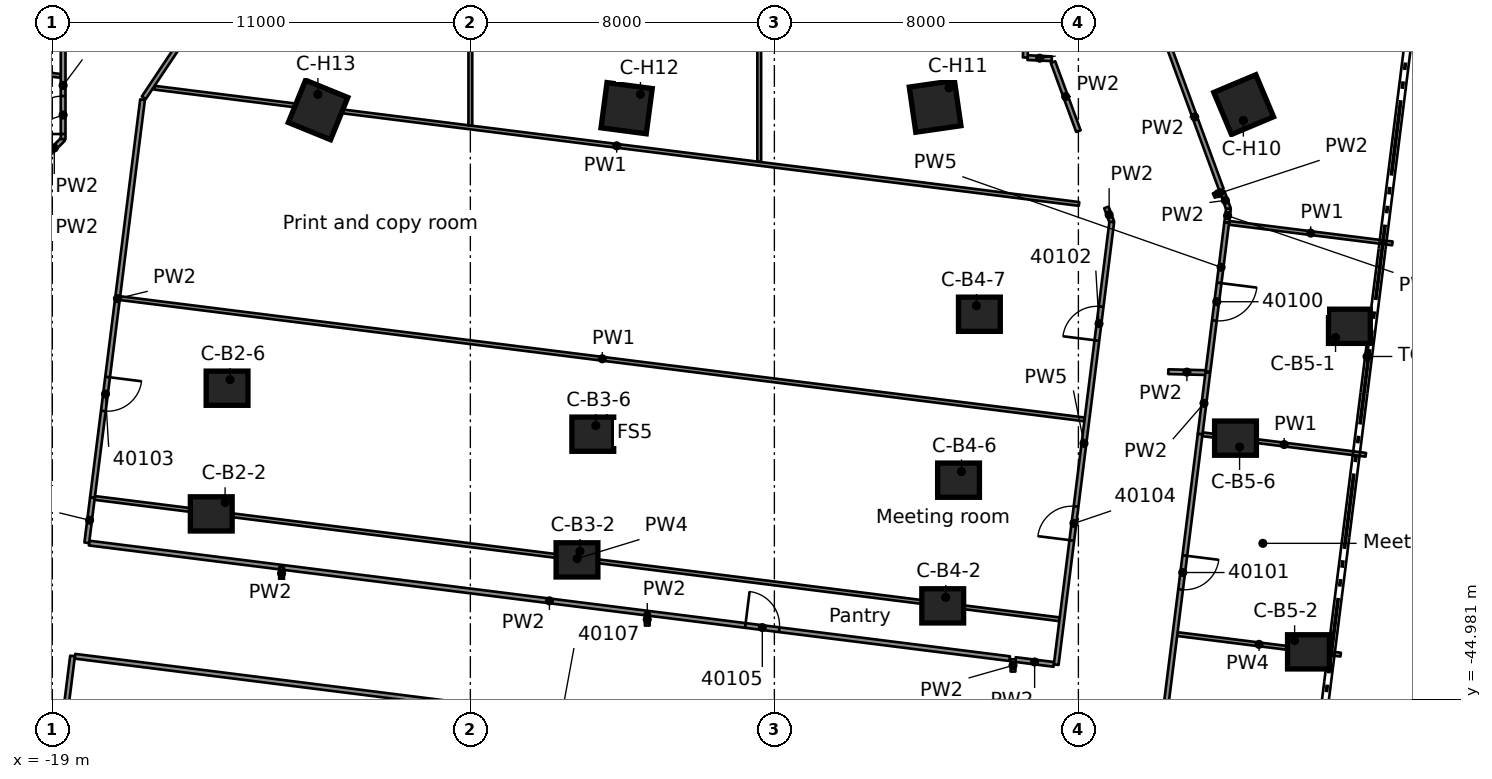
"""IFC4 building model, lengths in metres.
Left out: names, types, materials, properties, quantities, classifications, styles, units other than length and angle.
Written with IfcOpenShell. Run it as: python <this file> out.ifc"""

import sys

from ifc_helpers import new_model, si_unit, direction, frame, frame_2d, origin, origin_2d, place, context, subcontext, project, spatial, rectangle, extrude, element, fill, save


model = new_model("IFC4")
c1 = context("Model", 3, precision=1e-05, world=origin(), true_north=direction((0.0, 1.0)))
c2 = subcontext(c1, "Body", "Model", "MODEL_VIEW")
j1 = project(units=[si_unit("LENGTHUNIT", "METRE"), si_unit("PLANEANGLEUNIT", "RADIAN")], contexts=[c1])
p1 = place(None, origin())
s1 = spatial("IfcSite", under=j1, at=p1, CompositionType="ELEMENT")
p2 = place(p1, origin())
s2 = spatial("IfcBuilding", under=s1, at=p2, CompositionType="ELEMENT")
p3 = place(p2, frame((0.0, 0.0, 199.1)))
s3 = spatial("IfcBuildingStorey", under=s2, at=p3, CompositionType="ELEMENT", Elevation=199.1)
for number, where, z_axis, x_axis in (
    (1, (-14.818, -40.098, 0.0), (0.0, 0.0, 1.0), (1.0, 0.0, 0.0)),
    (2, (-14.402, -36.791, 0.0), (0.0, 0.0, 1.0), (1.0, 0.0, 0.0)),
    (3, (-5.194, -41.308, 0.0), (0.0, 0.0, 1.0), (1.0, 0.0, 0.0)),
    (4, (-4.778, -38.001, 0.0), (0.0, 0.0, 1.0), (1.0, 0.0, 0.0)),
    (5, (4.43, -42.518, 0.0), (0.0, 0.0, 1.0), (1.0, 0.0, 0.0)),
    (6, (4.846, -39.211, 0.0), (0.0, 0.0, 1.0), (1.0, 0.0, 0.0)),
    (7, (5.395, -34.845, 0.0), (0.0, 0.0, 1.0), (1.0, 0.0, 0.0)),
    (8, (15.131, -35.162, 0.0), (0.0, 0.0, 1.0), (1.0, 0.0, 0.0)),
    (9, (14.054, -43.728, 0.0), (0.0, 0.0, 1.0), (1.0, 0.0, 0.0)),
    (10, (12.134, -38.105, 0.0), (0.0, 0.0, 1.0), (1.0, 0.0, 0.0)),
):
    element("IfcColumn", number, at=place(p3, frame(where, z_axis=z_axis, x_axis=x_axis)), inside=s3, PredefinedType="COLUMN", context=c2, shape_type="SweptSolid", body=[
        extrude(rectangle(XDim=1.1, YDim=0.9, at=origin_2d()), origin(), (0.0, 0.0, 1.0), 3.5),
    ])
for number, where, z_axis, x_axis in (
    (11, (12.349, -29.329, 0.0), (0.0, 0.0, 1.0), (0.388, -0.922, 0.0)),
    (12, (4.23, -29.376, 0.0), (0.0, 0.0, 1.0), (0.143, -0.99, 0.0)),
    (13, (-3.888, -29.423, 0.0), (0.0, 0.0, 1.0), (-0.131, -0.991, 0.0)),
    (14, (-12.007, -29.47, 0.0), (0.0, 0.0, 1.0), (-0.377, -0.926, 0.0)),
):
    element("IfcColumn", number, at=place(p3, frame(where, z_axis=z_axis, x_axis=x_axis)), inside=s3, PredefinedType="COLUMN", context=c2, shape_type="SweptSolid", body=[
        extrude(rectangle(XDim=1.2, YDim=1.2, at=origin_2d()), origin(), (0.0, 0.0, 1.0), 3.5),
    ])
p4 = place(p3, frame((-0.399, -15.062, 0.0), z_axis=(0.0, 0.0, 1.0), x_axis=(6.1913754e-05, -0.999999998083, 0.0)))
e15 = element("IfcWall", 15, at=p4, inside=s3, PredefinedType="PARTITIONING", context=c2, shape_type="SweptSolid", body=[
    extrude(rectangle(XDim=15.773, YDim=0.1, at=frame_2d((7.886, 0.0))), origin(), (0.0, 0.0, 1.0), 3.03),
])
p5 = place(p3, frame((7.332, -28.21, 0.0), z_axis=(0.0, 0.0, 1.0), x_axis=(0.34522583337, -0.938519644959, 0.0)))
e16 = element("IfcWall", 16, at=p5, inside=s3, PredefinedType="PARTITIONING", context=c2, shape_type="SweptSolid", body=[
    extrude(rectangle(XDim=1.935, YDim=0.125, at=frame_2d((0.967, 0.0))), origin(), (0.0, 0.0, 1.0), 3.03),
])
p6 = place(p3, frame((8.738, -32.034, 0.0), z_axis=(0.0, 0.0, 1.0), x_axis=(0.344934891115, -0.938626614204, 0.0)))
e17 = element("IfcWall", 17, at=p6, inside=s3, PredefinedType="PARTITIONING", context=c2, shape_type="SweptSolid", body=[
    extrude(rectangle(XDim=0.411, YDim=0.125, at=frame_2d((0.206, 0.0))), origin(), (0.0, 0.0, 1.0), 3.03),
])
p7 = place(p3, frame((10.358, -27.743, 0.0), z_axis=(0.0, 0.0, 1.0), x_axis=(0.34503845991, -0.938588547332, 0.0)))
e18 = element("IfcWall", 18, at=p7, inside=s3, PredefinedType="PARTITIONING", context=c2, shape_type="SweptSolid", body=[
    extrude(rectangle(XDim=4.072, YDim=0.125, at=frame_2d((2.036, 0.0))), origin(), (0.0, 0.0, 1.0), 3.03),
])
p8 = place(p3, frame((11.786, -31.628, 0.0), z_axis=(0.0, 0.0, 1.0), x_axis=(0.346065449672, -0.938210373287, 0.0)))
e19 = element("IfcWall", 19, at=p8, inside=s3, PredefinedType="PARTITIONING", context=c2, shape_type="SweptSolid", body=[
    extrude(rectangle(XDim=0.471, YDim=0.125, at=frame_2d((0.236, 0.0))), origin(), (0.0, 0.0, 1.0), 3.03),
])
p9 = place(p3, frame((6.979, -47.035, 0.0), z_axis=(0.0, 0.0, 1.0), x_axis=(-0.992192052325, 0.124719410292, 0.0)))
e20 = element("IfcWall", 20, at=p9, inside=s3, PredefinedType="PARTITIONING", context=c2, shape_type="SweptSolid", body=[
    extrude(rectangle(XDim=25.585, YDim=0.125, at=frame_2d((12.792, 0.0))), origin(), (0.0, 0.0, 1.0), 3.03),
])
p10 = place(p9, frame((11.788, 0.0, 0.0)))
e21 = element("IfcOpeningElement", 21, at=p10, cuts=e20, PredefinedType="OPENING", context=c2, shape_type="SweptSolid", body=[
    extrude(rectangle(XDim=1.8, YDim=2.1, at=frame_2d((0.9, 1.05))), frame((0.0, 0.073, 0.0), z_axis=(0.0, -1.0, 0.0), x_axis=(1.0, 0.0, 0.0)), (0.0, 0.0, 1.0), 0.145),
])
p11 = place(p3, frame((-18.032, -40.866, 0.0), z_axis=(0.0, 0.0, 1.0), x_axis=(0.9922120451, -0.124560256738, 0.0)))
e22 = element("IfcWall", 22, at=p11, inside=s3, PredefinedType="PARTITIONING", context=c2, shape_type="SweptSolid", body=[
    extrude(rectangle(XDim=24.414, YDim=0.125, at=frame_2d((12.207, 0.0))), origin(), (0.0, 0.0, 1.0), 3.03),
])
p12 = place(p11, frame((17.404, 0.0, 0.0)))
e23 = element("IfcOpeningElement", 23, at=p12, cuts=e22, PredefinedType="OPENING", context=c2, shape_type="SweptSolid", body=[
    extrude(rectangle(XDim=0.9, YDim=2.1, at=frame_2d((0.45, 1.05))), frame((0.0, 0.073, 0.0), z_axis=(0.0, -1.0, 0.0), x_axis=(1.0, 0.0, 0.0)), (0.0, 0.0, 1.0), 0.145),
])
p13 = place(p3, frame((6.342, -43.931, 0.0), z_axis=(0.0, 0.0, 1.0), x_axis=(0.992192944833, -0.124712309833, 0.0)))
e24 = element("IfcWall", 24, at=p13, inside=s3, PredefinedType="PARTITIONING", context=c2, shape_type="SweptSolid", body=[
    extrude(rectangle(XDim=1.02, YDim=0.125, at=frame_2d((0.51, 0.0))), origin(), (0.0, 0.0, 1.0), 3.03),
])
p14 = place(p3, frame((-17.883, -39.679, 0.0), z_axis=(0.0, 0.0, 1.0), x_axis=(0.992186741223, -0.124761654932, 0.0)))
e25 = element("IfcWall", 25, at=p14, inside=s3, PredefinedType="PARTITIONING", context=c2, shape_type="SweptSolid", body=[
    extrude(rectangle(XDim=25.586, YDim=0.1, at=frame_2d((12.793, 0.0))), origin(), (0.0, 0.0, 1.0), 2.395),
])
p15 = place(p3, frame((10.605, -43.261, 0.0), z_axis=(0.0, 0.0, 1.0), x_axis=(0.992195268651, -0.124693820479, 0.0)))
e26 = element("IfcWall", 26, at=p15, inside=s3, PredefinedType="PARTITIONING", context=c2, shape_type="SweptSolid", body=[
    extrude(rectangle(XDim=4.331, YDim=0.1, at=frame_2d((2.166, 0.0))), origin(), (0.0, 0.0, 1.0), 2.395),
])
p16 = place(p3, frame((-17.221, -34.421, 0.0), z_axis=(0.0, 0.0, 1.0), x_axis=(0.992190871449, -0.124728804262, 0.0)))
e27 = element("IfcWall", 27, at=p16, inside=s3, PredefinedType="PARTITIONING", context=c2, shape_type="SweptSolid", body=[
    extrude(rectangle(XDim=25.585, YDim=0.1, at=frame_2d((12.792, 0.0))), origin(), (0.0, 0.0, 1.0), 3.03),
])
p17 = place(p3, frame((11.266, -38.003, 0.0), z_axis=(0.0, 0.0, 1.0), x_axis=(0.992194392082, -0.124700795187, 0.0)))
e28 = element("IfcWall", 28, at=p17, inside=s3, PredefinedType="PARTITIONING", context=c2, shape_type="SweptSolid", body=[
    extrude(rectangle(XDim=4.331, YDim=0.1, at=frame_2d((2.165, 0.0))), origin(), (0.0, 0.0, 1.0), 3.03),
])
p18 = place(p3, frame((-23.921, -27.927, 0.0), z_axis=(0.0, 0.0, 1.0), x_axis=(0.992179593467, -0.124818485443, 0.0)))
e29 = element("IfcWall", 29, at=p18, inside=s3, PredefinedType="PARTITIONING", context=c2, shape_type="SweptSolid", body=[
    extrude(rectangle(XDim=5.176, YDim=0.1, at=frame_2d((2.588, 0.0))), origin(), (0.0, 0.0, 1.0), 3.03),
])
p19 = place(p3, frame((-16.315, -28.884, 0.0), z_axis=(0.0, 0.0, 1.0), x_axis=(0.992189406065, -0.124740460527, 0.0)))
e30 = element("IfcWall", 30, at=p19, inside=s3, PredefinedType="PARTITIONING", context=c2, shape_type="SweptSolid", body=[
    extrude(rectangle(XDim=24.524, YDim=0.1, at=frame_2d((12.262, 0.0))), origin(), (0.0, 0.0, 1.0), 3.03),
])
p20 = place(p3, frame((11.965, -32.44, 0.0), z_axis=(0.0, 0.0, 1.0), x_axis=(0.992194392082, -0.124700795187, 0.0)))
e31 = element("IfcWall", 31, at=p20, inside=s3, PredefinedType="PARTITIONING", context=c2, shape_type="SweptSolid", body=[
    extrude(rectangle(XDim=4.331, YDim=0.1, at=frame_2d((2.165, 0.0))), origin(), (0.0, 0.0, 1.0), 3.03),
])
p21 = place(p3, frame((6.663, -28.093, 0.0), z_axis=(0.0, 0.0, 1.0), x_axis=(0.998961422795, -0.045563974439, 0.0)))
e32 = element("IfcWall", 32, at=p21, inside=s3, PredefinedType="PARTITIONING", context=c2, shape_type="SweptSolid", body=[
    extrude(rectangle(XDim=0.638, YDim=0.125, at=frame_2d((0.319, 0.0))), origin(), (0.0, 0.0, 1.0), 2.395),
])
p22 = place(p3, frame((10.366, -36.356, 0.0), z_axis=(0.0, 0.0, 1.0), x_axis=(0.999700907591, -0.024455988254, 0.0)))
e33 = element("IfcWall", 33, at=p22, inside=s3, PredefinedType="PARTITIONING", context=c2, shape_type="SweptSolid", body=[
    extrude(rectangle(XDim=0.978, YDim=0.125, at=frame_2d((0.489, 0.0))), origin(), (0.0, 0.0, 1.0), 3.03),
])
p23 = place(p3, frame((-19.182, -30.703, 0.0), z_axis=(0.0, 0.0, 1.0), x_axis=(0.707106781187, 0.707106781187, 0.0)))
e34 = element("IfcWall", 34, at=p23, inside=s3, PredefinedType="PARTITIONING", context=c2, shape_type="SweptSolid", body=[
    extrude(rectangle(XDim=0.659, YDim=0.125, at=frame_2d((0.329, 0.0))), origin(), (0.0, 0.0, 1.0), 3.03),
])
p24 = place(p3, frame((11.563, -31.721, 0.0), z_axis=(0.0, 0.0, 1.0), x_axis=(0.921426271694, 0.3885532471, 0.0)))
e35 = element("IfcWall", 35, at=p24, inside=s3, PredefinedType="PARTITIONING", context=c2, shape_type="SweptSolid", body=[
    extrude(rectangle(XDim=0.242, YDim=0.125, at=frame_2d((0.121, 0.0))), origin(), (0.0, 0.0, 1.0), 3.03),
])
p25 = place(p3, frame((-12.993, -23.745, 0.0), z_axis=(0.0, 0.0, 1.0), x_axis=(-0.554439865958, -0.832223789035, 0.0)))
e36 = element("IfcWall", 36, at=p25, inside=s3, PredefinedType="PARTITIONING", context=c2, shape_type="SweptSolid", body=[
    extrude(rectangle(XDim=6.493, YDim=0.125, at=frame_2d((3.247, 0.0))), origin(), (0.0, 0.0, 1.0), 3.03),
])
p26 = place(p3, frame((11.903, -32.432, 0.0), z_axis=(0.0, 0.0, 1.0), x_axis=(0.125847054802, 0.992049655409, 0.0)))
e37 = element("IfcWall", 37, at=p26, inside=s3, PredefinedType="PARTITIONING", context=c2, shape_type="SweptSolid", body=[
    extrude(rectangle(XDim=0.365, YDim=0.125, at=frame_2d((0.182, 0.0))), origin(), (0.0, 0.0, 1.0), 3.03),
])
p27 = place(p3, frame((11.204, -37.994, 0.0), z_axis=(0.0, 0.0, 1.0), x_axis=(-0.124761850955, -0.992186716574, 0.0)))
e38 = element("IfcWall", 38, at=p27, inside=s3, PredefinedType="PARTITIONING", context=c2, shape_type="SweptSolid", body=[
    extrude(rectangle(XDim=18.347, YDim=0.125, at=frame_2d((9.174, 0.0))), origin(), (0.0, 0.0, 1.0), 2.395),
])
p28 = place(p27, frame((3.225, 0.0, 0.0)))
e39 = element("IfcOpeningElement", 39, at=p28, cuts=e38, PredefinedType="OPENING", context=c2, shape_type="SweptSolid", body=[
    extrude(rectangle(XDim=0.9, YDim=2.1, at=frame_2d((0.45, 1.05))), frame((0.0, 0.073, 0.0), z_axis=(0.0, -1.0, 0.0), x_axis=(1.0, 0.0, 0.0)), (0.0, 0.0, 1.0), 0.145),
])
p29 = place(p3, frame((11.903, -32.432, 0.0), z_axis=(0.0, 0.0, 1.0), x_axis=(-0.124726255985, -0.992191191791, 0.0)))
e40 = element("IfcWall", 40, at=p29, inside=s3, PredefinedType="PARTITIONING", context=c2, shape_type="SweptSolid", body=[
    extrude(rectangle(XDim=3.954, YDim=0.125, at=frame_2d((1.977, 0.0))), origin(), (0.0, 0.0, 1.0), 2.395),
])
p30 = place(p29, frame((1.6, 0.0, 0.0)))
e41 = element("IfcOpeningElement", 41, at=p30, cuts=e40, PredefinedType="OPENING", context=c2, shape_type="SweptSolid", body=[
    extrude(rectangle(XDim=1.0, YDim=2.1, at=frame_2d((0.5, 1.05))), frame((0.0, 0.073, 0.0), z_axis=(0.0, -1.0, 0.0), x_axis=(1.0, 0.0, 0.0)), (0.0, 0.0, 1.0), 0.145),
])
p31 = place(p3, frame((7.416, -44.066, 0.0), z_axis=(0.0, 0.0, 1.0), x_axis=(0.124521004899, 0.992216971906, 0.0)))
e42 = element("IfcWall", 42, at=p31, inside=s3, PredefinedType="PARTITIONING", context=c2, shape_type="SweptSolid", body=[
    extrude(rectangle(XDim=11.74, YDim=0.125, at=frame_2d((5.87, 0.0))), origin(), (0.0, 0.0, 1.0), 2.395),
])
p32 = place(p31, frame((8.597, 0.0, 0.0)))
e43 = element("IfcOpeningElement", 43, at=p32, cuts=e42, PredefinedType="OPENING", context=c2, shape_type="SweptSolid", body=[
    extrude(rectangle(XDim=0.9, YDim=2.1, at=frame_2d((0.45, 1.05))), frame((0.0, 0.073, 0.0), z_axis=(0.0, -1.0, 0.0), x_axis=(1.0, 0.0, 0.0)), (0.0, 0.0, 1.0), 0.145),
])
p33 = place(p31, frame((3.296, 0.0, 0.0)))
e44 = element("IfcOpeningElement", 44, at=p33, cuts=e42, PredefinedType="OPENING", context=c2, shape_type="SweptSolid", body=[
    extrude(rectangle(XDim=0.9, YDim=2.1, at=frame_2d((0.45, 1.05))), frame((0.0, 0.073, 0.0), z_axis=(0.0, -1.0, 0.0), x_axis=(1.0, 0.0, 0.0)), (0.0, 0.0, 1.0), 0.145),
])
p34 = place(p3, frame((-19.304, -50.486, 0.0), z_axis=(0.0, 0.0, 1.0), x_axis=(0.124720623553, 0.992191899816, 0.0)))
e45 = element("IfcWall", 45, at=p34, inside=s3, PredefinedType="PARTITIONING", context=c2, shape_type="SweptSolid", body=[
    extrude(rectangle(XDim=6.702, YDim=0.125, at=frame_2d((3.351, 0.0))), origin(), (0.0, 0.0, 1.0), 3.03),
])
p35 = place(p3, frame((-16.626, -29.198, 0.0), z_axis=(0.0, 0.0, 1.0), x_axis=(-0.1249655299, -0.992161083865, 0.0)))
e46 = element("IfcWall", 46, at=p35, inside=s3, PredefinedType="PARTITIONING", context=c2, shape_type="SweptSolid", body=[
    extrude(rectangle(XDim=10.556, YDim=0.125, at=frame_2d((5.278, 0.0))), origin(), (0.0, 0.0, 1.0), 3.03),
])
p36 = place(p35, frame((7.356, 0.0, 0.0)))
e47 = element("IfcOpeningElement", 47, at=p36, cuts=e46, PredefinedType="OPENING", context=c2, shape_type="SweptSolid", body=[
    extrude(rectangle(XDim=0.9, YDim=2.1, at=frame_2d((0.45, 1.05))), frame((0.0, 0.073, 0.0), z_axis=(0.0, -1.0, 0.0), x_axis=(1.0, 0.0, 0.0)), (0.0, 0.0, 1.0), 0.145),
])
p37 = place(p3, frame((-18.094, -40.858, 0.0), z_axis=(0.0, 0.0, 1.0), x_axis=(0.124486830253, 0.99222126015, 0.0)))
e48 = element("IfcWall", 48, at=p37, inside=s3, PredefinedType="PARTITIONING", context=c2, shape_type="SweptSolid", body=[
    extrude(rectangle(XDim=1.196, YDim=0.125, at=frame_2d((0.598, 0.0))), origin(), (0.0, 0.0, 1.0), 3.03),
])
p38 = place(p3, frame((11.204, -37.995, 0.0), z_axis=(0.0, 0.0, 1.0), x_axis=(0.124201089062, 0.992257068242, 0.0)))
e49 = element("IfcWall", 49, at=p38, inside=s3, PredefinedType="PARTITIONING", context=c2, shape_type="SweptSolid", body=[
    extrude(rectangle(XDim=1.626, YDim=0.125, at=frame_2d((0.813, 0.0))), origin(), (0.0, 0.0, 1.0), 3.03),
])
p39 = place(p3, frame((6.601, -28.09, 0.0), z_axis=(0.0, 0.0, 1.0), x_axis=(0.045702609905, 0.998955089805, 0.0)))
e50 = element("IfcWall", 50, at=p39, inside=s3, PredefinedType="PARTITIONING", context=c2, shape_type="SweptSolid", body=[
    extrude(rectangle(XDim=13.104, YDim=0.125, at=frame_2d((6.552, 0.0))), origin(), (0.0, 0.0, 1.0), 3.03),
])
p40 = place(p39, frame((4.6, 0.0, 0.0)))
e51 = element("IfcOpeningElement", 51, at=p40, cuts=e50, PredefinedType="OPENING", context=c2, shape_type="SweptSolid", body=[
    extrude(rectangle(XDim=0.9, YDim=2.1, at=frame_2d((0.45, 1.05))), frame((0.0, 0.073, 0.0), z_axis=(0.0, -1.0, 0.0), x_axis=(1.0, 0.0, 0.0)), (0.0, 0.0, 1.0), 0.145),
])
p41 = place(p3, frame((6.28, -44.247, 0.0), z_axis=(0.0, 0.0, 1.0), x_axis=(0.0, 1.0, 0.0)))
e52 = element("IfcWall", 52, at=p41, inside=s3, PredefinedType="PARTITIONING", context=c2, shape_type="SweptSolid", body=[
    extrude(rectangle(XDim=0.324, YDim=0.125, at=frame_2d((0.162, 0.0))), origin(), (0.0, 0.0, 1.0), 3.03),
])
p42 = place(p3, frame((-3.345, -43.037, 0.0), z_axis=(0.0, 0.0, 1.0), x_axis=(0.0, 1.0, 0.0)))
e53 = element("IfcWall", 53, at=p42, inside=s3, PredefinedType="PARTITIONING", context=c2, shape_type="SweptSolid", body=[
    extrude(rectangle(XDim=0.324, YDim=0.125, at=frame_2d((0.162, 0.0))), origin(), (0.0, 0.0, 1.0), 3.03),
])
p43 = place(p3, frame((-8.0, -29.879, 0.0), z_axis=(0.0, 0.0, 1.0), x_axis=(0.0, 1.0, 0.0)))
e54 = element("IfcWall", 54, at=p43, inside=s3, PredefinedType="PARTITIONING", context=c2, shape_type="SweptSolid", body=[
    extrude(rectangle(XDim=14.816, YDim=0.1, at=frame_2d((7.408, 0.0))), origin(), (0.0, 0.0, 1.0), 3.03),
])
p44 = place(p3, frame((-12.968, -41.827, 0.0), z_axis=(0.0, 0.0, 1.0), x_axis=(0.0, 1.0, 0.0)))
e55 = element("IfcWall", 55, at=p44, inside=s3, PredefinedType="PARTITIONING", context=c2, shape_type="SweptSolid", body=[
    extrude(rectangle(XDim=0.324, YDim=0.125, at=frame_2d((0.162, 0.0))), origin(), (0.0, 0.0, 1.0), 3.03),
])
p45 = place(p3, frame((-18.716, -30.237, 0.0), z_axis=(0.0, 0.0, 1.0), x_axis=(0.0, 1.0, 0.0)))
e56 = element("IfcWall", 56, at=p45, inside=s3, PredefinedType="PARTITIONING", context=c2, shape_type="SweptSolid", body=[
    extrude(rectangle(XDim=2.826, YDim=0.125, at=frame_2d((1.413, 0.0))), origin(), (0.0, 0.0, 1.0), 3.03),
])
p46 = place(p45, frame((0.134, 0.0, 0.0)))
e57 = element("IfcOpeningElement", 57, at=p46, cuts=e56, PredefinedType="OPENING", context=c2, shape_type="SweptSolid", body=[
    extrude(rectangle(XDim=1.0, YDim=2.1, at=frame_2d((0.5, 1.05))), frame((0.0, 0.073, 0.0), z_axis=(0.0, -1.0, 0.0), x_axis=(1.0, 0.0, 0.0)), (0.0, 0.0, 1.0), 0.145),
])
p47 = place(p30, origin())
e58 = element("IfcDoor", 58, at=p47, inside=s3, OperationType="SINGLE_SWING_RIGHT", PredefinedType="DOOR", context=c2, shape_type="SweptSolid", body=[
    extrude(rectangle(XDim=1.0, YDim=2.1, at=frame_2d((0.5, 1.05))), frame((0.0, 0.025, 0.0), z_axis=(0.0, -1.0, 0.0), x_axis=(1.0, 0.0, 0.0)), (0.0, 0.0, 1.0), 0.05),
])
fill(e41, e58)
p48 = place(p28, origin())
e59 = element("IfcDoor", 59, at=p48, inside=s3, OperationType="SINGLE_SWING_LEFT", PredefinedType="DOOR", context=c2, shape_type="SweptSolid", body=[
    extrude(rectangle(XDim=0.9, YDim=2.1, at=frame_2d((0.45, 1.05))), frame((0.0, 0.025, 0.0), z_axis=(0.0, -1.0, 0.0), x_axis=(1.0, 0.0, 0.0)), (0.0, 0.0, 1.0), 0.05),
])
fill(e39, e59)
p49 = place(p32, origin())
e60 = element("IfcDoor", 60, at=p49, inside=s3, OperationType="SINGLE_SWING_RIGHT", PredefinedType="DOOR", context=c2, shape_type="SweptSolid", body=[
    extrude(rectangle(XDim=0.9, YDim=2.1, at=frame_2d((0.45, 1.05))), frame((0.0, 0.025, 0.0), z_axis=(0.0, -1.0, 0.0), x_axis=(1.0, 0.0, 0.0)), (0.0, 0.0, 1.0), 0.05),
])
fill(e43, e60)
p50 = place(p36, origin())
e61 = element("IfcDoor", 61, at=p50, inside=s3, OperationType="SINGLE_SWING_RIGHT", PredefinedType="DOOR", context=c2, shape_type="SweptSolid", body=[
    extrude(rectangle(XDim=0.9, YDim=2.1, at=frame_2d((0.45, 1.05))), frame((0.0, 0.025, 0.0), z_axis=(0.0, -1.0, 0.0), x_axis=(1.0, 0.0, 0.0)), (0.0, 0.0, 1.0), 0.05),
])
fill(e47, e61)
p51 = place(p33, origin())
e62 = element("IfcDoor", 62, at=p51, inside=s3, OperationType="SINGLE_SWING_LEFT", PredefinedType="DOOR", context=c2, shape_type="SweptSolid", body=[
    extrude(rectangle(XDim=0.9, YDim=2.1, at=frame_2d((0.45, 1.05))), frame((0.0, 0.025, 0.0), z_axis=(0.0, -1.0, 0.0), x_axis=(1.0, 0.0, 0.0)), (0.0, 0.0, 1.0), 0.05),
])
fill(e44, e62)
p52 = place(p12, origin())
e63 = element("IfcDoor", 63, at=p52, inside=s3, OperationType="SINGLE_SWING_RIGHT", PredefinedType="DOOR", context=c2, shape_type="SweptSolid", body=[
    extrude(rectangle(XDim=0.9, YDim=2.1, at=frame_2d((0.45, 1.05))), frame((0.0, 0.025, 0.0), z_axis=(0.0, -1.0, 0.0), x_axis=(1.0, 0.0, 0.0)), (0.0, 0.0, 1.0), 0.05),
])
fill(e23, e63)
p53 = place(p46, origin())
e64 = element("IfcDoor", 64, at=p53, inside=s3, OperationType="SINGLE_SWING_LEFT", PredefinedType="DOOR", context=c2, shape_type="SweptSolid", body=[
    extrude(rectangle(XDim=1.0, YDim=2.1, at=frame_2d((0.5, 1.05))), frame((0.0, 0.025, 0.0), z_axis=(0.0, -1.0, 0.0), x_axis=(1.0, 0.0, 0.0)), (0.0, 0.0, 1.0), 0.05),
])
fill(e57, e64)
save(model, sys.argv[1])
